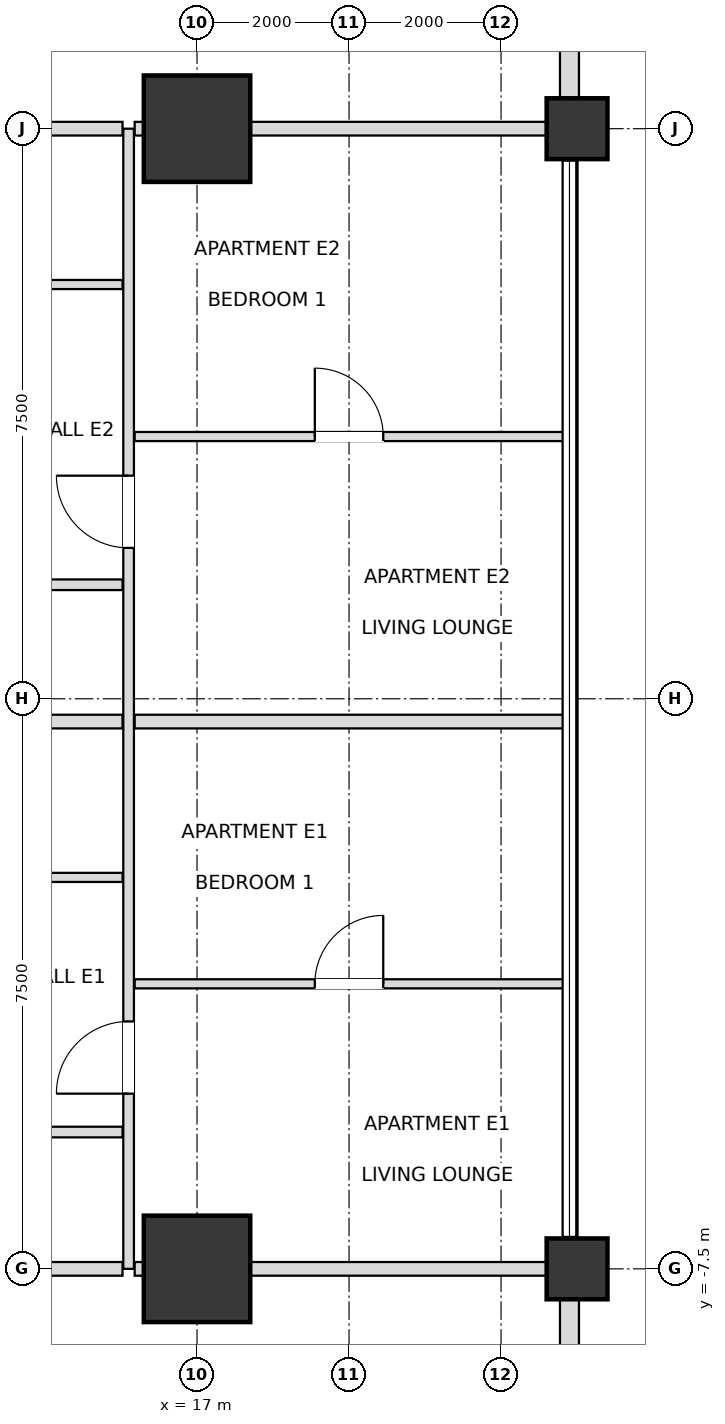
"""IFC4 building model, lengths in metres.
Left out: names, types, materials, properties, quantities, classifications, styles, units other than length and angle.
Written with IfcOpenShell. Run it as: python <this file> out.ifc"""

import sys

from ifc_helpers import new_model, si_unit, direction, frame, frame_2d, origin, origin_2d, place, context, subcontext, project, spatial, rectangle, extrude, element, fill, save


model = new_model("IFC4")
c1 = context("Model", 3, precision=1e-05, world=origin(), true_north=direction((0.0, 1.0)))
c2 = subcontext(c1, "Body", "Model", "MODEL_VIEW")
j1 = project(units=[si_unit("LENGTHUNIT", "METRE"), si_unit("PLANEANGLEUNIT", "RADIAN")], contexts=[c1])
p1 = place(None, origin())
s1 = spatial("IfcSite", under=j1, at=p1, CompositionType="ELEMENT")
p2 = place(p1, origin())
s2 = spatial("IfcBuilding", under=s1, at=p2, CompositionType="ELEMENT")
p3 = place(p2, frame((0.0, 0.0, 90.0)))
s3 = spatial("IfcBuildingStorey", under=s2, at=p3, CompositionType="ELEMENT", Elevation=90.0)
for number, where, z_axis, x_axis in (
    (1, (17.0, -7.5, 0.0), (0.0, 0.0, 1.0), (1.0, 0.0, 0.0)),
    (2, (17.0, 7.5, 0.0), (0.0, 0.0, 1.0), (1.0, 0.0, 0.0)),
):
    element("IfcColumn", number, at=place(p3, frame(where, z_axis=z_axis, x_axis=x_axis)), inside=s3, PredefinedType="USERDEFINED", context=c2, shape_type="SweptSolid", body=[
        extrude(rectangle(XDim=1.4, YDim=1.4, at=origin_2d()), origin(), (0.0, 0.0, 1.0), 3.6),
    ])
for number, where, z_axis, x_axis in (
    (3, (22.0, -7.5, 0.0), (0.0, 0.0, 1.0), (1.0, 0.0, 0.0)),
    (4, (22.0, 7.5, 0.0), (0.0, 0.0, 1.0), (1.0, 0.0, 0.0)),
):
    element("IfcColumn", number, at=place(p3, frame(where, z_axis=z_axis, x_axis=x_axis)), inside=s3, PredefinedType="COLUMN", context=c2, shape_type="SweptSolid", body=[
        extrude(rectangle(XDim=0.8, YDim=0.8, at=origin_2d()), origin(), (0.0, 0.0, 1.0), 3.6),
    ])
p4 = place(p3, frame((21.9, -12.605, 0.0), z_axis=(0.0, 0.0, 1.0), x_axis=(0.0, 1.0, 0.0)))
e5 = element("IfcWall", 5, at=p4, inside=s3, PredefinedType="SOLIDWALL", context=c2, shape_type="SweptSolid", body=[
    extrude(rectangle(XDim=4.71, YDim=0.25, at=frame_2d((2.355, 0.0))), origin(), (0.0, 0.0, 1.0), 2.59),
])
p5 = place(p4, frame((1.455, 0.0, 0.72)))
e6 = element("IfcOpeningElement", 6, at=p5, cuts=e5, PredefinedType="OPENING", context=c2, shape_type="SweptSolid", body=[
    extrude(rectangle(XDim=1.8, YDim=1.68, at=frame_2d((0.9, 0.84))), frame((0.0, 0.135, 0.0), z_axis=(0.0, -1.0, 0.0), x_axis=(1.0, 0.0, 0.0)), (0.0, 0.0, 1.0), 0.27),
])
p6 = place(p3, frame((21.9, 7.895, 0.0), z_axis=(0.0, 0.0, 1.0), x_axis=(0.0, 1.0, 0.0)))
e7 = element("IfcWall", 7, at=p6, inside=s3, PredefinedType="SOLIDWALL", context=c2, shape_type="SweptSolid", body=[
    extrude(rectangle(XDim=4.71, YDim=0.25, at=frame_2d((2.355, 0.0))), origin(), (0.0, 0.0, 1.0), 2.59),
])
p7 = place(p6, frame((1.455, 0.0, 0.72)))
e8 = element("IfcOpeningElement", 8, at=p7, cuts=e7, PredefinedType="OPENING", context=c2, shape_type="SweptSolid", body=[
    extrude(rectangle(XDim=1.8, YDim=1.68, at=frame_2d((0.9, 0.84))), frame((0.0, 0.135, 0.0), z_axis=(0.0, -1.0, 0.0), x_axis=(1.0, 0.0, 0.0)), (0.0, 0.0, 1.0), 0.27),
])
p8 = place(p3, frame((16.1, -7.5, 0.0), z_axis=(0.0, 0.0, 1.0), x_axis=(0.0, 1.0, 0.0)))
e9 = element("IfcWall", 9, at=p8, inside=s3, PredefinedType="PARTITIONING", context=c2, shape_type="SweptSolid", body=[
    extrude(rectangle(XDim=15.0, YDim=0.14, at=frame_2d((7.5, 0.0))), origin(), (0.0, 0.0, 1.0), 3.3),
])
p9 = place(p8, frame((2.305, 0.0, 0.0)))
e10 = element("IfcOpeningElement", 10, at=p9, cuts=e9, PredefinedType="OPENING", context=c2, shape_type="SweptSolid", body=[
    extrude(rectangle(XDim=0.95, YDim=2.1, at=frame_2d((0.475, 1.05))), frame((0.0, 0.08, 0.0), z_axis=(0.0, -1.0, 0.0), x_axis=(1.0, 0.0, 0.0)), (0.0, 0.0, 1.0), 0.16),
])
p10 = place(p8, frame((9.485, 0.0, 0.0)))
e11 = element("IfcOpeningElement", 11, at=p10, cuts=e9, PredefinedType="OPENING", context=c2, shape_type="SweptSolid", body=[
    extrude(rectangle(XDim=0.95, YDim=2.1, at=frame_2d((0.475, 1.05))), frame((0.0, 0.08, 0.0), z_axis=(0.0, -1.0, 0.0), x_axis=(1.0, 0.0, 0.0)), (0.0, 0.0, 1.0), 0.16),
])
p11 = place(p3, frame((8.38, -7.5, 0.0), z_axis=(0.0, 0.0, 1.0), x_axis=(1.0, 0.0, 0.0)))
e12 = element("IfcWall", 12, at=p11, inside=s3, PredefinedType="PARTITIONING", context=c2, shape_type="SweptSolid", body=[
    extrude(rectangle(XDim=7.64, YDim=0.18, at=frame_2d((3.82, 0.0))), origin(), (0.0, 0.0, 1.0), 2.736),
])
p12 = place(p3, frame((16.18, -7.5, 0.0), z_axis=(0.0, 0.0, 1.0), x_axis=(1.0, 0.0, 0.0)))
e13 = element("IfcWall", 13, at=p12, inside=s3, PredefinedType="PARTITIONING", context=c2, shape_type="SweptSolid", body=[
    extrude(rectangle(XDim=5.72, YDim=0.18, at=frame_2d((2.86, 0.0))), origin(), (0.0, 0.0, 1.0), 2.736),
])
p13 = place(p3, frame((8.38, -5.7, 0.0), z_axis=(0.0, 0.0, 1.0), x_axis=(1.0, 0.0, 0.0)))
e14 = element("IfcWall", 14, at=p13, inside=s3, PredefinedType="PARTITIONING", context=c2, shape_type="SweptSolid", body=[
    extrude(rectangle(XDim=7.64, YDim=0.14, at=frame_2d((3.82, 0.0))), origin(), (0.0, 0.0, 1.0), 2.868),
])
p14 = place(p13, frame((3.37, 0.0, 0.0)))
e15 = element("IfcOpeningElement", 15, at=p14, cuts=e14, PredefinedType="OPENING", context=c2, shape_type="SweptSolid", body=[
    extrude(rectangle(XDim=0.9, YDim=2.1, at=frame_2d((0.45, 1.05))), frame((0.0, 0.08, 0.0), z_axis=(0.0, -1.0, 0.0), x_axis=(1.0, 0.0, 0.0)), (0.0, 0.0, 1.0), 0.16),
])
p15 = place(p3, frame((16.18, -3.75, 0.0), z_axis=(0.0, 0.0, 1.0), x_axis=(1.0, 0.0, 0.0)))
e16 = element("IfcWall", 16, at=p15, inside=s3, PredefinedType="PARTITIONING", context=c2, shape_type="SweptSolid", body=[
    extrude(rectangle(XDim=5.64, YDim=0.12, at=frame_2d((2.82, 0.0))), origin(), (0.0, 0.0, 1.0), 2.736),
])
p16 = place(p15, frame((2.37, 0.0, 0.0)))
e17 = element("IfcOpeningElement", 17, at=p16, cuts=e16, PredefinedType="OPENING", context=c2, shape_type="SweptSolid", body=[
    extrude(rectangle(XDim=0.9, YDim=2.1, at=frame_2d((0.45, 1.05))), frame((0.0, 0.07, 0.0), z_axis=(0.0, -1.0, 0.0), x_axis=(1.0, 0.0, 0.0)), (0.0, 0.0, 1.0), 0.14),
])
p17 = place(p3, frame((8.38, -2.35, 0.0), z_axis=(0.0, 0.0, 1.0), x_axis=(1.0, 0.0, 0.0)))
e18 = element("IfcWall", 18, at=p17, inside=s3, PredefinedType="PARTITIONING", context=c2, shape_type="SweptSolid", body=[
    extrude(rectangle(XDim=7.64, YDim=0.12, at=frame_2d((3.82, 0.0))), origin(), (0.0, 0.0, 1.0), 2.868),
])
p18 = place(p17, frame((3.345, 0.0, 0.0)))
e19 = element("IfcOpeningElement", 19, at=p18, cuts=e18, PredefinedType="OPENING", context=c2, shape_type="SweptSolid", body=[
    extrude(rectangle(XDim=0.95, YDim=2.1, at=frame_2d((0.475, 1.05))), frame((0.0, 0.07, 0.0), z_axis=(0.0, -1.0, 0.0), x_axis=(1.0, 0.0, 0.0)), (0.0, 0.0, 1.0), 0.14),
])
p19 = place(p3, frame((8.38, -0.3, 0.0), z_axis=(0.0, 0.0, 1.0), x_axis=(1.0, 0.0, 0.0)))
e20 = element("IfcWall", 20, at=p19, inside=s3, PredefinedType="PARTITIONING", context=c2, shape_type="SweptSolid", body=[
    extrude(rectangle(XDim=7.64, YDim=0.18, at=frame_2d((3.82, 0.0))), origin(), (0.0, 0.0, 1.0), 2.868),
])
p20 = place(p3, frame((16.18, -0.3, 0.0), z_axis=(0.0, 0.0, 1.0), x_axis=(1.0, 0.0, 0.0)))
e21 = element("IfcWall", 21, at=p20, inside=s3, PredefinedType="PARTITIONING", context=c2, shape_type="SweptSolid", body=[
    extrude(rectangle(XDim=5.64, YDim=0.18, at=frame_2d((2.82, 0.0))), origin(), (0.0, 0.0, 1.0), 2.736),
])
p21 = place(p3, frame((8.38, 1.5, 0.0), z_axis=(0.0, 0.0, 1.0), x_axis=(1.0, 0.0, 0.0)))
e22 = element("IfcWall", 22, at=p21, inside=s3, PredefinedType="PARTITIONING", context=c2, shape_type="SweptSolid", body=[
    extrude(rectangle(XDim=7.64, YDim=0.14, at=frame_2d((3.82, 0.0))), origin(), (0.0, 0.0, 1.0), 2.868),
])
p22 = place(p21, frame((3.37, 0.0, 0.0)))
e23 = element("IfcOpeningElement", 23, at=p22, cuts=e22, PredefinedType="OPENING", context=c2, shape_type="SweptSolid", body=[
    extrude(rectangle(XDim=0.9, YDim=2.1, at=frame_2d((0.45, 1.05))), frame((0.0, 0.08, 0.0), z_axis=(0.0, -1.0, 0.0), x_axis=(1.0, 0.0, 0.0)), (0.0, 0.0, 1.0), 0.16),
])
p23 = place(p3, frame((16.18, 3.45, 0.0), z_axis=(0.0, 0.0, 1.0), x_axis=(1.0, 0.0, 0.0)))
e24 = element("IfcWall", 24, at=p23, inside=s3, PredefinedType="PARTITIONING", context=c2, shape_type="SweptSolid", body=[
    extrude(rectangle(XDim=5.64, YDim=0.12, at=frame_2d((2.82, 0.0))), origin(), (0.0, 0.0, 1.0), 2.736),
])
p24 = place(p23, frame((2.37, 0.0, 0.0)))
e25 = element("IfcOpeningElement", 25, at=p24, cuts=e24, PredefinedType="OPENING", context=c2, shape_type="SweptSolid", body=[
    extrude(rectangle(XDim=0.9, YDim=2.1, at=frame_2d((0.45, 1.05))), frame((0.0, 0.07, 0.0), z_axis=(0.0, -1.0, 0.0), x_axis=(1.0, 0.0, 0.0)), (0.0, 0.0, 1.0), 0.14),
])
p25 = place(p3, frame((8.38, 5.45, 0.0), z_axis=(0.0, 0.0, 1.0), x_axis=(1.0, 0.0, 0.0)))
e26 = element("IfcWall", 26, at=p25, inside=s3, PredefinedType="PARTITIONING", context=c2, shape_type="SweptSolid", body=[
    extrude(rectangle(XDim=7.64, YDim=0.12, at=frame_2d((3.82, 0.0))), origin(), (0.0, 0.0, 1.0), 2.868),
])
p26 = place(p25, frame((3.345, 0.0, 0.0)))
e27 = element("IfcOpeningElement", 27, at=p26, cuts=e26, PredefinedType="OPENING", context=c2, shape_type="SweptSolid", body=[
    extrude(rectangle(XDim=0.95, YDim=2.1, at=frame_2d((0.475, 1.05))), frame((0.0, 0.07, 0.0), z_axis=(0.0, -1.0, 0.0), x_axis=(1.0, 0.0, 0.0)), (0.0, 0.0, 1.0), 0.14),
])
p27 = place(p3, frame((8.38, 7.5, 0.0), z_axis=(0.0, 0.0, 1.0), x_axis=(1.0, 0.0, 0.0)))
e28 = element("IfcWall", 28, at=p27, inside=s3, PredefinedType="PARTITIONING", context=c2, shape_type="SweptSolid", body=[
    extrude(rectangle(XDim=7.64, YDim=0.18, at=frame_2d((3.82, 0.0))), origin(), (0.0, 0.0, 1.0), 2.736),
])
p28 = place(p3, frame((16.18, 7.5, 0.0), z_axis=(0.0, 0.0, 1.0), x_axis=(1.0, 0.0, 0.0)))
e29 = element("IfcWall", 29, at=p28, inside=s3, PredefinedType="PARTITIONING", context=c2, shape_type="SweptSolid", body=[
    extrude(rectangle(XDim=5.72, YDim=0.18, at=frame_2d((2.86, 0.0))), origin(), (0.0, 0.0, 1.0), 2.736),
])
p29 = place(p9, origin())
e30 = element("IfcDoor", 30, at=p29, inside=s3, OperationType="SINGLE_SWING_LEFT", PredefinedType="DOOR", context=c2, shape_type="SweptSolid", body=[
    extrude(rectangle(XDim=0.95, YDim=2.1, at=frame_2d((0.475, 1.05))), frame((0.0, 0.025, 0.0), z_axis=(0.0, -1.0, 0.0), x_axis=(1.0, 0.0, 0.0)), (0.0, 0.0, 1.0), 0.05),
])
fill(e10, e30)
p30 = place(p16, origin())
e31 = element("IfcDoor", 31, at=p30, inside=s3, OperationType="SINGLE_SWING_RIGHT", PredefinedType="DOOR", context=c2, shape_type="SweptSolid", body=[
    extrude(rectangle(XDim=0.9, YDim=2.1, at=frame_2d((0.45, 1.05))), frame((0.0, 0.025, 0.0), z_axis=(0.0, -1.0, 0.0), x_axis=(1.0, 0.0, 0.0)), (0.0, 0.0, 1.0), 0.05),
])
fill(e17, e31)
p31 = place(p10, origin())
e32 = element("IfcDoor", 32, at=p31, inside=s3, OperationType="SINGLE_SWING_RIGHT", PredefinedType="DOOR", context=c2, shape_type="SweptSolid", body=[
    extrude(rectangle(XDim=0.95, YDim=2.1, at=frame_2d((0.475, 1.05))), frame((0.0, 0.025, 0.0), z_axis=(0.0, -1.0, 0.0), x_axis=(1.0, 0.0, 0.0)), (0.0, 0.0, 1.0), 0.05),
])
fill(e11, e32)
p32 = place(p24, origin())
e33 = element("IfcDoor", 33, at=p32, inside=s3, OperationType="SINGLE_SWING_LEFT", PredefinedType="DOOR", context=c2, shape_type="SweptSolid", body=[
    extrude(rectangle(XDim=0.9, YDim=2.1, at=frame_2d((0.45, 1.05))), frame((0.0, 0.025, 0.0), z_axis=(0.0, -1.0, 0.0), x_axis=(1.0, 0.0, 0.0)), (0.0, 0.0, 1.0), 0.05),
])
fill(e25, e33)
save(model, sys.argv[1])
